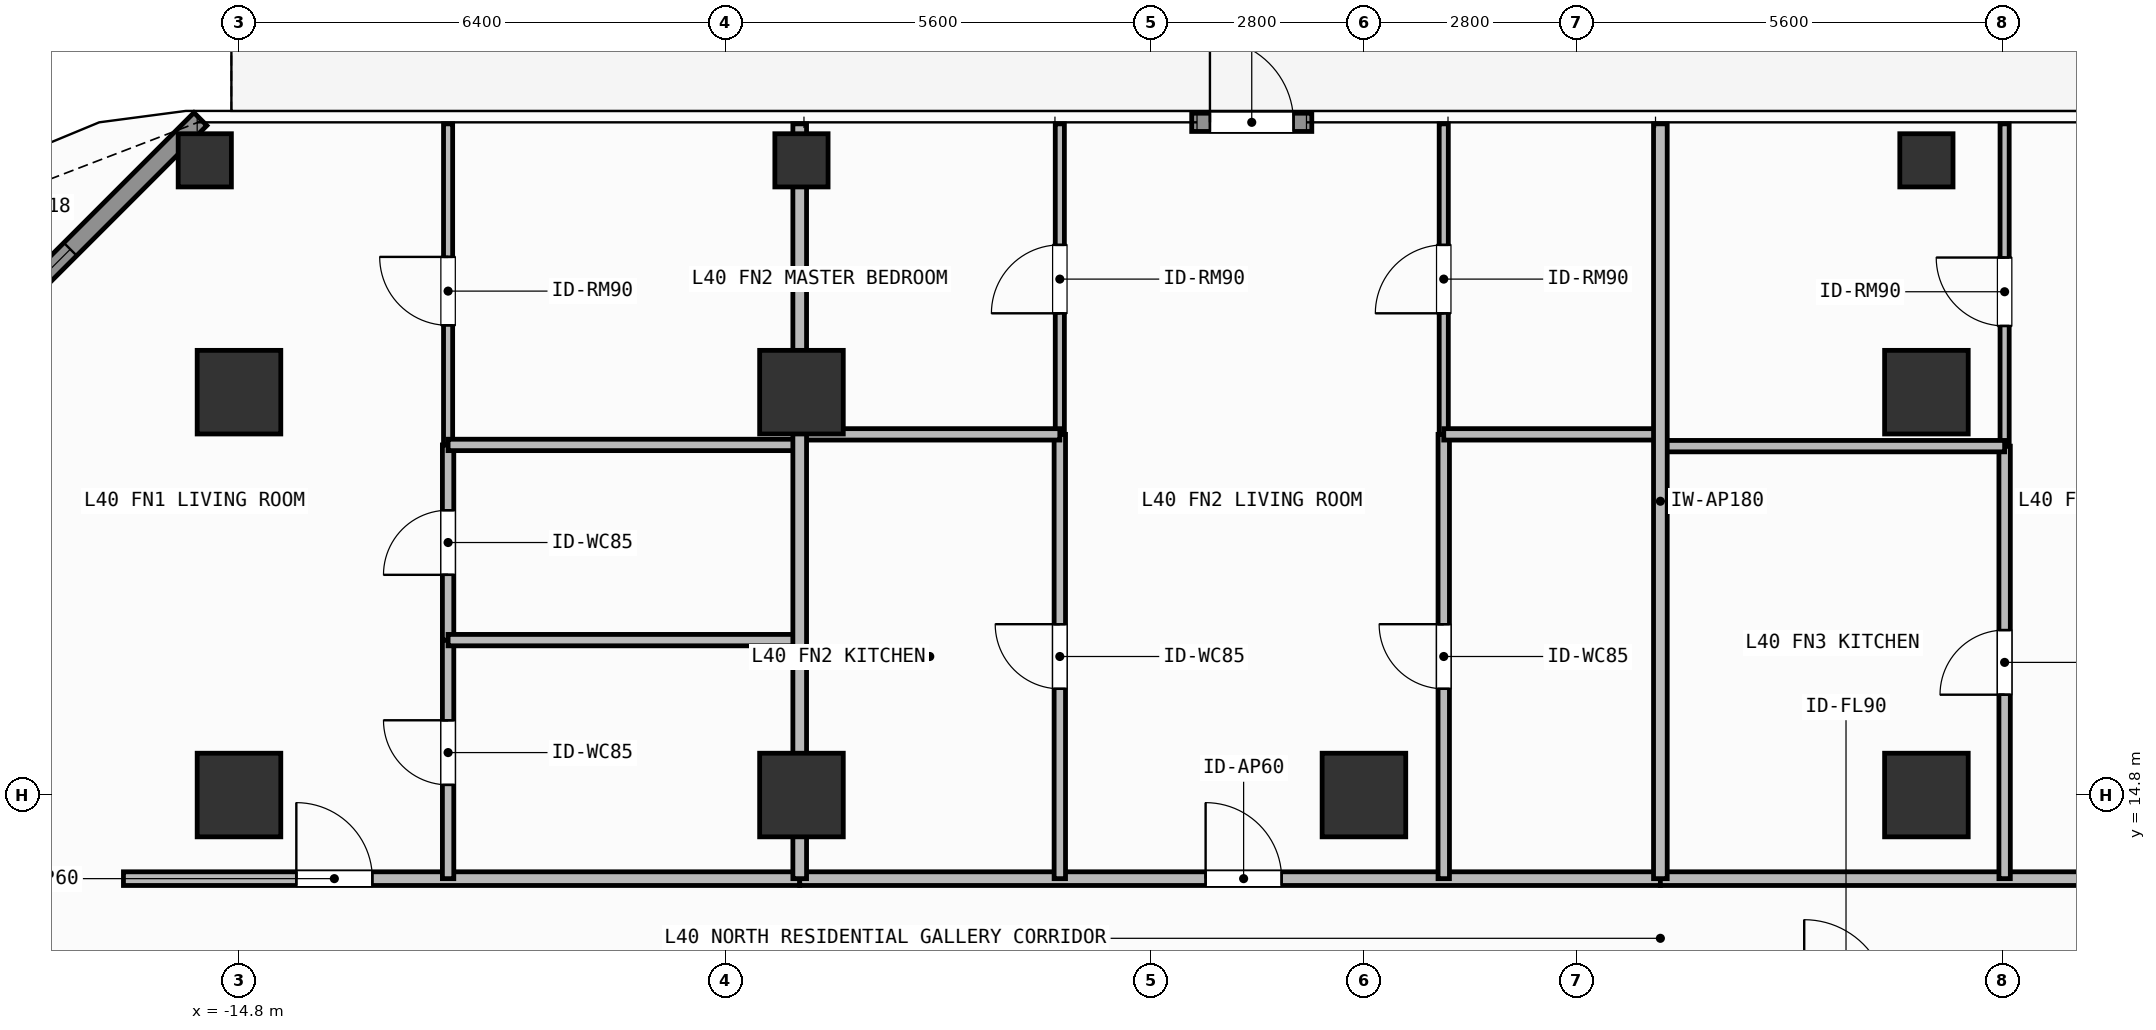
"""IFC4 building model, lengths in metres.
Left out: names, types, materials, properties, quantities, classifications, styles, units other than length and angle.
Written with IfcOpenShell. Run it as: python <this file> out.ifc"""

import sys

from ifc_helpers import new_model, si_unit, direction, frame, frame_2d, origin, origin_2d, place, context, subcontext, project, spatial, rectangle, hollow_rectangle, extrude, element, fill, save


model = new_model("IFC4")
c1 = context("Model", 3, precision=1e-05, world=origin(), true_north=direction((0.0, 1.0)))
c2 = subcontext(c1, "Body", "Model", "MODEL_VIEW")
j1 = project(units=[si_unit("LENGTHUNIT", "METRE"), si_unit("PLANEANGLEUNIT", "RADIAN")], contexts=[c1])
p1 = place(None, origin())
s1 = spatial("IfcSite", under=j1, at=p1, CompositionType="ELEMENT")
p2 = place(p1, origin())
s2 = spatial("IfcBuilding", under=s1, at=p2, CompositionType="ELEMENT")
p3 = place(p2, frame((0.0, 0.0, 164.1)))
s3 = spatial("IfcBuildingStorey", under=s2, at=p3, CompositionType="ELEMENT", Elevation=164.1)
for number, where, z_axis, x_axis in (
    (1, (-14.8, 14.8, 0.0), (0.0, 0.0, 1.0), (1.0, 0.0, 0.0)),
    (2, (-7.4, 14.8, 0.0), (0.0, 0.0, 1.0), (1.0, 0.0, 0.0)),
    (3, (0.0, 14.8, 0.0), (0.0, 0.0, 1.0), (1.0, 0.0, 0.0)),
    (4, (7.4, 14.8, 0.0), (0.0, 0.0, 1.0), (1.0, 0.0, 0.0)),
    (5, (-14.8, 20.1, 0.0), (0.0, 0.0, 1.0), (1.0, 0.0, 0.0)),
    (6, (-7.4, 20.1, 0.0), (0.0, 0.0, 1.0), (1.0, 0.0, 0.0)),
    (7, (7.4, 20.1, 0.0), (0.0, 0.0, 1.0), (1.0, 0.0, 0.0)),
):
    element("IfcColumn", number, at=place(p3, frame(where, z_axis=z_axis, x_axis=x_axis)), inside=s3, PredefinedType="COLUMN", context=c2, shape_type="SweptSolid", body=[
        extrude(rectangle(XDim=1.1, YDim=1.1, at=origin_2d()), origin(), (0.0, 0.0, 1.0), 3.9),
    ])
for number, where, z_axis, x_axis in (
    (8, (-15.25, 23.15, 0.0), (0.0, 0.0, 1.0), (1.0, 0.0, 0.0)),
    (9, (-7.4, 23.15, 0.0), (0.0, 0.0, 1.0), (1.0, 0.0, 0.0)),
    (10, (7.4, 23.15, 0.0), (0.0, 0.0, 1.0), (1.0, 0.0, 0.0)),
):
    element("IfcColumn", number, at=place(p3, frame(where, z_axis=z_axis, x_axis=x_axis)), inside=s3, PredefinedType="COLUMN", context=c2, shape_type="SweptSolid", body=[
        extrude(hollow_rectangle(XDim=0.7, YDim=0.7, WallThickness=0.032, at=origin_2d()), origin(), (0.0, 0.0, 1.0), 3.9),
    ])
p4 = place(p3, frame((-2.266, 23.65, 0.0), z_axis=(0.0, 0.0, 1.0), x_axis=(1.0, 0.0, 0.0)))
e11 = element("IfcWall", 11, at=p4, inside=s3, PredefinedType="SOLIDWALL", context=c2, shape_type="SweptSolid", body=[
    extrude(rectangle(XDim=1.58, YDim=0.24, at=frame_2d((0.79, 0.0))), origin(), (0.0, 0.0, 1.0), 3.62),
])
p5 = place(p4, frame((0.24, 0.0, 0.0)))
e12 = element("IfcOpeningElement", 12, at=p5, cuts=e11, PredefinedType="OPENING", context=c2, shape_type="SweptSolid", body=[
    extrude(rectangle(XDim=1.1, YDim=2.2, at=frame_2d((0.55, 1.1))), frame((0.0, 0.13, 0.0), z_axis=(0.0, -1.0, 0.0), x_axis=(1.0, 0.0, 0.0)), (0.0, 0.0, 1.0), 0.26),
])
p6 = place(p3, frame((-19.792, 19.208, 0.0), z_axis=(0.0, 0.0, 1.0), x_axis=(0.707106781187, 0.707106781187, 0.0)))
e13 = element("IfcWall", 13, at=p6, inside=s3, PredefinedType="SOLIDWALL", context=c2, shape_type="SweptSolid", body=[
    extrude(rectangle(XDim=6.343, YDim=0.24, at=frame_2d((3.171, 0.0))), origin(), (0.0, 0.0, 1.0), 3.62),
])
p7 = place(p6, frame((2.421, 0.0, 0.8)))
e14 = element("IfcOpeningElement", 14, at=p7, cuts=e13, PredefinedType="OPENING", context=c2, shape_type="SweptSolid", body=[
    extrude(rectangle(XDim=1.5, YDim=1.85, at=frame_2d((0.75, 0.925))), frame((0.0, 0.13, 0.0), z_axis=(0.0, -1.0, 0.0), x_axis=(1.0, 0.0, 0.0)), (0.0, 0.0, 1.0), 0.26),
])
p8 = place(p3, frame((-16.32, 13.7, 0.0), z_axis=(0.0, 0.0, 1.0), x_axis=(1.0, 0.0, 0.0)))
e15 = element("IfcWall", 15, at=p8, inside=s3, PredefinedType="PARTITIONING", context=c2, shape_type="SweptSolid", body=[
    extrude(rectangle(XDim=8.897, YDim=0.18, at=frame_2d((4.448, 0.0))), origin(), (0.0, 0.0, 1.0), 3.62),
])
p9 = place(p8, frame((2.274, 0.0, 0.0)))
e16 = element("IfcOpeningElement", 16, at=p9, cuts=e15, PredefinedType="OPENING", context=c2, shape_type="SweptSolid", body=[
    extrude(rectangle(XDim=1.0, YDim=2.2, at=frame_2d((0.5, 1.1))), frame((0.0, 0.1, 0.0), z_axis=(0.0, -1.0, 0.0), x_axis=(1.0, 0.0, 0.0)), (0.0, 0.0, 1.0), 0.2),
])
p10 = place(p3, frame((-12.049, 13.7, 0.0), z_axis=(0.0, 0.0, 1.0), x_axis=(0.0, 1.0, 0.0)))
e17 = element("IfcWall", 17, at=p10, inside=s3, PredefinedType="PARTITIONING", context=c2, shape_type="SweptSolid", body=[
    extrude(rectangle(XDim=3.138, YDim=0.15, at=frame_2d((1.569, 0.0))), origin(), (0.0, 0.0, 1.0), 3.62),
])
p11 = place(p10, frame((1.233, 0.0, 0.0)))
e18 = element("IfcOpeningElement", 18, at=p11, cuts=e17, PredefinedType="OPENING", context=c2, shape_type="SweptSolid", body=[
    extrude(rectangle(XDim=0.85, YDim=2.1, at=frame_2d((0.425, 1.05))), frame((0.0, 0.085, 0.0), z_axis=(0.0, -1.0, 0.0), x_axis=(1.0, 0.0, 0.0)), (0.0, 0.0, 1.0), 0.17),
])
p12 = place(p3, frame((-12.049, 16.838, 0.0), z_axis=(0.0, 0.0, 1.0), x_axis=(0.0, 1.0, 0.0)))
e19 = element("IfcWall", 19, at=p12, inside=s3, PredefinedType="PARTITIONING", context=c2, shape_type="SweptSolid", body=[
    extrude(rectangle(XDim=2.568, YDim=0.15, at=frame_2d((1.284, 0.0))), origin(), (0.0, 0.0, 1.0), 3.62),
])
p13 = place(p12, frame((0.859, 0.0, 0.0)))
e20 = element("IfcOpeningElement", 20, at=p13, cuts=e19, PredefinedType="OPENING", context=c2, shape_type="SweptSolid", body=[
    extrude(rectangle(XDim=0.85, YDim=2.1, at=frame_2d((0.425, 1.05))), frame((0.0, 0.085, 0.0), z_axis=(0.0, -1.0, 0.0), x_axis=(1.0, 0.0, 0.0)), (0.0, 0.0, 1.0), 0.17),
])
p14 = place(p3, frame((-12.049, 19.406, 0.0), z_axis=(0.0, 0.0, 1.0), x_axis=(0.0, 1.0, 0.0)))
e21 = element("IfcWall", 21, at=p14, inside=s3, PredefinedType="PARTITIONING", context=c2, shape_type="SweptSolid", body=[
    extrude(rectangle(XDim=4.224, YDim=0.12, at=frame_2d((2.112, 0.0))), origin(), (0.0, 0.0, 1.0), 3.62),
])
p15 = place(p14, frame((1.573, 0.0, 0.0)))
e22 = element("IfcOpeningElement", 22, at=p15, cuts=e21, PredefinedType="OPENING", context=c2, shape_type="SweptSolid", body=[
    extrude(rectangle(XDim=0.9, YDim=2.1, at=frame_2d((0.45, 1.05))), frame((0.0, 0.07, 0.0), z_axis=(0.0, -1.0, 0.0), x_axis=(1.0, 0.0, 0.0)), (0.0, 0.0, 1.0), 0.14),
])
p16 = place(p3, frame((-7.423, 13.7, 0.0), z_axis=(0.0, 0.0, 1.0), x_axis=(1.0, 0.0, 0.0)))
e23 = element("IfcWall", 23, at=p16, inside=s3, PredefinedType="PARTITIONING", context=c2, shape_type="SweptSolid", body=[
    extrude(rectangle(XDim=11.323, YDim=0.18, at=frame_2d((5.662, 0.0))), origin(), (0.0, 0.0, 1.0), 3.62),
])
p17 = place(p16, frame((5.34, 0.0, 0.0)))
e24 = element("IfcOpeningElement", 24, at=p17, cuts=e23, PredefinedType="OPENING", context=c2, shape_type="SweptSolid", body=[
    extrude(rectangle(XDim=1.0, YDim=2.2, at=frame_2d((0.5, 1.1))), frame((0.0, 0.1, 0.0), z_axis=(0.0, -1.0, 0.0), x_axis=(1.0, 0.0, 0.0)), (0.0, 0.0, 1.0), 0.2),
])
p18 = place(p3, frame((-4.001, 13.7, 0.0), z_axis=(0.0, 0.0, 1.0), x_axis=(0.0, 1.0, 0.0)))
e25 = element("IfcWall", 25, at=p18, inside=s3, PredefinedType="PARTITIONING", context=c2, shape_type="SweptSolid", body=[
    extrude(rectangle(XDim=5.845, YDim=0.15, at=frame_2d((2.922, 0.0))), origin(), (0.0, 0.0, 1.0), 3.62),
])
p19 = place(p18, frame((2.498, 0.0, 0.0)))
e26 = element("IfcOpeningElement", 26, at=p19, cuts=e25, PredefinedType="OPENING", context=c2, shape_type="SweptSolid", body=[
    extrude(rectangle(XDim=0.85, YDim=2.1, at=frame_2d((0.425, 1.05))), frame((0.0, 0.085, 0.0), z_axis=(0.0, -1.0, 0.0), x_axis=(1.0, 0.0, 0.0)), (0.0, 0.0, 1.0), 0.17),
])
p20 = place(p3, frame((-4.001, 19.545, 0.0), z_axis=(0.0, 0.0, 1.0), x_axis=(0.0, 1.0, 0.0)))
e27 = element("IfcWall", 27, at=p20, inside=s3, PredefinedType="PARTITIONING", context=c2, shape_type="SweptSolid", body=[
    extrude(rectangle(XDim=4.085, YDim=0.12, at=frame_2d((2.042, 0.0))), origin(), (0.0, 0.0, 1.0), 3.62),
])
p21 = place(p20, frame((1.593, 0.0, 0.0)))
e28 = element("IfcOpeningElement", 28, at=p21, cuts=e27, PredefinedType="OPENING", context=c2, shape_type="SweptSolid", body=[
    extrude(rectangle(XDim=0.9, YDim=2.1, at=frame_2d((0.45, 1.05))), frame((0.0, 0.07, 0.0), z_axis=(0.0, -1.0, 0.0), x_axis=(1.0, 0.0, 0.0)), (0.0, 0.0, 1.0), 0.14),
])
p22 = place(p3, frame((1.05, 13.7, 0.0), z_axis=(0.0, 0.0, 1.0), x_axis=(0.0, 1.0, 0.0)))
e29 = element("IfcWall", 29, at=p22, inside=s3, PredefinedType="PARTITIONING", context=c2, shape_type="SweptSolid", body=[
    extrude(rectangle(XDim=5.845, YDim=0.15, at=frame_2d((2.922, 0.0))), origin(), (0.0, 0.0, 1.0), 3.62),
])
p23 = place(p22, frame((2.498, 0.0, 0.0)))
e30 = element("IfcOpeningElement", 30, at=p23, cuts=e29, PredefinedType="OPENING", context=c2, shape_type="SweptSolid", body=[
    extrude(rectangle(XDim=0.85, YDim=2.1, at=frame_2d((0.425, 1.05))), frame((0.0, 0.085, 0.0), z_axis=(0.0, -1.0, 0.0), x_axis=(1.0, 0.0, 0.0)), (0.0, 0.0, 1.0), 0.17),
])
p24 = place(p3, frame((1.05, 19.545, 0.0), z_axis=(0.0, 0.0, 1.0), x_axis=(0.0, 1.0, 0.0)))
e31 = element("IfcWall", 31, at=p24, inside=s3, PredefinedType="PARTITIONING", context=c2, shape_type="SweptSolid", body=[
    extrude(rectangle(XDim=4.085, YDim=0.12, at=frame_2d((2.042, 0.0))), origin(), (0.0, 0.0, 1.0), 3.62),
])
p25 = place(p24, frame((1.593, 0.0, 0.0)))
e32 = element("IfcOpeningElement", 32, at=p25, cuts=e31, PredefinedType="OPENING", context=c2, shape_type="SweptSolid", body=[
    extrude(rectangle(XDim=0.9, YDim=2.1, at=frame_2d((0.45, 1.05))), frame((0.0, 0.07, 0.0), z_axis=(0.0, -1.0, 0.0), x_axis=(1.0, 0.0, 0.0)), (0.0, 0.0, 1.0), 0.14),
])
p26 = place(p3, frame((3.9, 13.7, 0.0), z_axis=(0.0, 0.0, 1.0), x_axis=(1.0, 0.0, 0.0)))
e33 = element("IfcWall", 33, at=p26, inside=s3, PredefinedType="PARTITIONING", context=c2, shape_type="SweptSolid", body=[
    extrude(rectangle(XDim=11.323, YDim=0.18, at=frame_2d((5.662, 0.0))), origin(), (0.0, 0.0, 1.0), 3.62),
])
p27 = place(p26, frame((5.519, 0.0, 0.0)))
e34 = element("IfcOpeningElement", 34, at=p27, cuts=e33, PredefinedType="OPENING", context=c2, shape_type="SweptSolid", body=[
    extrude(rectangle(XDim=1.0, YDim=2.2, at=frame_2d((0.5, 1.1))), frame((0.0, 0.1, 0.0), z_axis=(0.0, -1.0, 0.0), x_axis=(1.0, 0.0, 0.0)), (0.0, 0.0, 1.0), 0.2),
])
p28 = place(p3, frame((8.429, 13.7, 0.0), z_axis=(0.0, 0.0, 1.0), x_axis=(0.0, 1.0, 0.0)))
e35 = element("IfcWall", 35, at=p28, inside=s3, PredefinedType="PARTITIONING", context=c2, shape_type="SweptSolid", body=[
    extrude(rectangle(XDim=5.69, YDim=0.15, at=frame_2d((2.845, 0.0))), origin(), (0.0, 0.0, 1.0), 3.62),
])
p29 = place(p28, frame((2.42, 0.0, 0.0)))
e36 = element("IfcOpeningElement", 36, at=p29, cuts=e35, PredefinedType="OPENING", context=c2, shape_type="SweptSolid", body=[
    extrude(rectangle(XDim=0.85, YDim=2.1, at=frame_2d((0.425, 1.05))), frame((0.0, 0.085, 0.0), z_axis=(0.0, -1.0, 0.0), x_axis=(1.0, 0.0, 0.0)), (0.0, 0.0, 1.0), 0.17),
])
p30 = place(p3, frame((8.429, 19.39, 0.0), z_axis=(0.0, 0.0, 1.0), x_axis=(0.0, 1.0, 0.0)))
e37 = element("IfcWall", 37, at=p30, inside=s3, PredefinedType="PARTITIONING", context=c2, shape_type="SweptSolid", body=[
    extrude(rectangle(XDim=4.24, YDim=0.12, at=frame_2d((2.12, 0.0))), origin(), (0.0, 0.0, 1.0), 3.62),
])
p31 = place(p30, frame((1.581, 0.0, 0.0)))
e38 = element("IfcOpeningElement", 38, at=p31, cuts=e37, PredefinedType="OPENING", context=c2, shape_type="SweptSolid", body=[
    extrude(rectangle(XDim=0.9, YDim=2.1, at=frame_2d((0.45, 1.05))), frame((0.0, 0.07, 0.0), z_axis=(0.0, -1.0, 0.0), x_axis=(1.0, 0.0, 0.0)), (0.0, 0.0, 1.0), 0.14),
])
for number, where, z_axis, x_axis in (
    (39, (-12.049, 16.838, 0.0), (0.0, 0.0, 1.0), (1.0, 0.0, 0.0)),
    (40, (-12.049, 19.406, 0.0), (0.0, 0.0, 1.0), (1.0, 0.0, 0.0)),
):
    element("IfcWall", number, at=place(p3, frame(where, z_axis=z_axis, x_axis=x_axis)), inside=s3, PredefinedType="PARTITIONING", context=c2, shape_type="SweptSolid", body=[
        extrude(rectangle(XDim=4.626, YDim=0.15, at=frame_2d((2.313, 0.0))), origin(), (0.0, 0.0, 1.0), 3.62),
    ])
p32 = place(p3, frame((-7.423, 19.545, 0.0), z_axis=(0.0, 0.0, 1.0), x_axis=(1.0, 0.0, 0.0)))
e41 = element("IfcWall", 41, at=p32, inside=s3, PredefinedType="PARTITIONING", context=c2, shape_type="SweptSolid", body=[
    extrude(rectangle(XDim=3.422, YDim=0.15, at=frame_2d((1.711, 0.0))), origin(), (0.0, 0.0, 1.0), 3.62),
])
p33 = place(p3, frame((1.05, 19.545, 0.0), z_axis=(0.0, 0.0, 1.0), x_axis=(1.0, 0.0, 0.0)))
e42 = element("IfcWall", 42, at=p33, inside=s3, PredefinedType="PARTITIONING", context=c2, shape_type="SweptSolid", body=[
    extrude(rectangle(XDim=2.85, YDim=0.15, at=frame_2d((1.425, 0.0))), origin(), (0.0, 0.0, 1.0), 3.62),
])
p34 = place(p3, frame((-7.423, 13.7, 0.0), z_axis=(0.0, 0.0, 1.0), x_axis=(0.0, 1.0, 0.0)))
e43 = element("IfcWall", 43, at=p34, inside=s3, PredefinedType="PARTITIONING", context=c2, shape_type="SweptSolid", body=[
    extrude(rectangle(XDim=9.93, YDim=0.18, at=frame_2d((4.965, 0.0))), origin(), (0.0, 0.0, 1.0), 2.71),
])
p35 = place(p3, frame((3.9, 19.39, 0.0), z_axis=(0.0, 0.0, 1.0), x_axis=(1.0, 0.0, 0.0)))
e44 = element("IfcWall", 44, at=p35, inside=s3, PredefinedType="PARTITIONING", context=c2, shape_type="SweptSolid", body=[
    extrude(rectangle(XDim=4.529, YDim=0.15, at=frame_2d((2.265, 0.0))), origin(), (0.0, 0.0, 1.0), 3.62),
])
p36 = place(p3, frame((3.9, 13.7, 0.0), z_axis=(0.0, 0.0, 1.0), x_axis=(0.0, 1.0, 0.0)))
e45 = element("IfcWall", 45, at=p36, inside=s3, PredefinedType="PARTITIONING", context=c2, shape_type="SweptSolid", body=[
    extrude(rectangle(XDim=9.93, YDim=0.18, at=frame_2d((4.965, 0.0))), origin(), (0.0, 0.0, 1.0), 3.62),
])
p37 = place(p5, origin())
e46 = element("IfcDoor", 46, at=p37, inside=s3, OperationType="SINGLE_SWING_LEFT", PredefinedType="DOOR", context=c2, shape_type="SweptSolid", body=[
    extrude(rectangle(XDim=1.1, YDim=2.2, at=frame_2d((0.55, 1.1))), frame((0.0, 0.025, 0.0), z_axis=(0.0, -1.0, 0.0), x_axis=(1.0, 0.0, 0.0)), (0.0, 0.0, 1.0), 0.05),
])
fill(e12, e46)
p38 = place(p7, origin())
e47 = element("IfcWindow", 47, at=p38, inside=s3, PartitioningType="SINGLE_PANEL", PredefinedType="WINDOW", context=c2, shape_type="SweptSolid", body=[
    extrude(rectangle(XDim=1.5, YDim=1.85, at=frame_2d((0.75, 0.925))), frame((0.0, 0.03, 0.0), z_axis=(0.0, -1.0, 0.0), x_axis=(1.0, 0.0, 0.0)), (0.0, 0.0, 1.0), 0.06),
])
fill(e14, e47)
p39 = place(p9, origin())
e48 = element("IfcDoor", 48, at=p39, inside=s3, OperationType="SINGLE_SWING_LEFT", PredefinedType="DOOR", context=c2, shape_type="SweptSolid", body=[
    extrude(rectangle(XDim=1.0, YDim=2.2, at=frame_2d((0.5, 1.1))), frame((0.0, 0.025, 0.0), z_axis=(0.0, -1.0, 0.0), x_axis=(1.0, 0.0, 0.0)), (0.0, 0.0, 1.0), 0.05),
])
fill(e16, e48)
p40 = place(p11, origin())
e49 = element("IfcDoor", 49, at=p40, inside=s3, OperationType="SINGLE_SWING_RIGHT", PredefinedType="DOOR", context=c2, shape_type="SweptSolid", body=[
    extrude(rectangle(XDim=0.85, YDim=2.1, at=frame_2d((0.425, 1.05))), frame((0.0, 0.025, 0.0), z_axis=(0.0, -1.0, 0.0), x_axis=(1.0, 0.0, 0.0)), (0.0, 0.0, 1.0), 0.05),
])
fill(e18, e49)
p41 = place(p13, origin())
e50 = element("IfcDoor", 50, at=p41, inside=s3, OperationType="SINGLE_SWING_LEFT", PredefinedType="DOOR", context=c2, shape_type="SweptSolid", body=[
    extrude(rectangle(XDim=0.85, YDim=2.1, at=frame_2d((0.425, 1.05))), frame((0.0, 0.025, 0.0), z_axis=(0.0, -1.0, 0.0), x_axis=(1.0, 0.0, 0.0)), (0.0, 0.0, 1.0), 0.05),
])
fill(e20, e50)
p42 = place(p15, origin())
e51 = element("IfcDoor", 51, at=p42, inside=s3, OperationType="SINGLE_SWING_RIGHT", PredefinedType="DOOR", context=c2, shape_type="SweptSolid", body=[
    extrude(rectangle(XDim=0.9, YDim=2.1, at=frame_2d((0.45, 1.05))), frame((0.0, 0.025, 0.0), z_axis=(0.0, -1.0, 0.0), x_axis=(1.0, 0.0, 0.0)), (0.0, 0.0, 1.0), 0.05),
])
fill(e22, e51)
p43 = place(p17, origin())
e52 = element("IfcDoor", 52, at=p43, inside=s3, OperationType="SINGLE_SWING_LEFT", PredefinedType="DOOR", context=c2, shape_type="SweptSolid", body=[
    extrude(rectangle(XDim=1.0, YDim=2.2, at=frame_2d((0.5, 1.1))), frame((0.0, 0.025, 0.0), z_axis=(0.0, -1.0, 0.0), x_axis=(1.0, 0.0, 0.0)), (0.0, 0.0, 1.0), 0.05),
])
fill(e24, e52)
p44 = place(p19, origin())
e53 = element("IfcDoor", 53, at=p44, inside=s3, OperationType="SINGLE_SWING_RIGHT", PredefinedType="DOOR", context=c2, shape_type="SweptSolid", body=[
    extrude(rectangle(XDim=0.85, YDim=2.1, at=frame_2d((0.425, 1.05))), frame((0.0, 0.025, 0.0), z_axis=(0.0, -1.0, 0.0), x_axis=(1.0, 0.0, 0.0)), (0.0, 0.0, 1.0), 0.05),
])
fill(e26, e53)
p45 = place(p21, origin())
e54 = element("IfcDoor", 54, at=p45, inside=s3, OperationType="SINGLE_SWING_LEFT", PredefinedType="DOOR", context=c2, shape_type="SweptSolid", body=[
    extrude(rectangle(XDim=0.9, YDim=2.1, at=frame_2d((0.45, 1.05))), frame((0.0, 0.025, 0.0), z_axis=(0.0, -1.0, 0.0), x_axis=(1.0, 0.0, 0.0)), (0.0, 0.0, 1.0), 0.05),
])
fill(e28, e54)
p46 = place(p23, origin())
e55 = element("IfcDoor", 55, at=p46, inside=s3, OperationType="SINGLE_SWING_RIGHT", PredefinedType="DOOR", context=c2, shape_type="SweptSolid", body=[
    extrude(rectangle(XDim=0.85, YDim=2.1, at=frame_2d((0.425, 1.05))), frame((0.0, 0.025, 0.0), z_axis=(0.0, -1.0, 0.0), x_axis=(1.0, 0.0, 0.0)), (0.0, 0.0, 1.0), 0.05),
])
fill(e30, e55)
p47 = place(p25, origin())
e56 = element("IfcDoor", 56, at=p47, inside=s3, OperationType="SINGLE_SWING_LEFT", PredefinedType="DOOR", context=c2, shape_type="SweptSolid", body=[
    extrude(rectangle(XDim=0.9, YDim=2.1, at=frame_2d((0.45, 1.05))), frame((0.0, 0.025, 0.0), z_axis=(0.0, -1.0, 0.0), x_axis=(1.0, 0.0, 0.0)), (0.0, 0.0, 1.0), 0.05),
])
fill(e32, e56)
p48 = place(p29, origin())
e57 = element("IfcDoor", 57, at=p48, inside=s3, OperationType="SINGLE_SWING_LEFT", PredefinedType="DOOR", context=c2, shape_type="SweptSolid", body=[
    extrude(rectangle(XDim=0.85, YDim=2.1, at=frame_2d((0.425, 1.05))), frame((0.0, 0.025, 0.0), z_axis=(0.0, -1.0, 0.0), x_axis=(1.0, 0.0, 0.0)), (0.0, 0.0, 1.0), 0.05),
])
fill(e36, e57)
p49 = place(p31, origin())
e58 = element("IfcDoor", 58, at=p49, inside=s3, OperationType="SINGLE_SWING_RIGHT", PredefinedType="DOOR", context=c2, shape_type="SweptSolid", body=[
    extrude(rectangle(XDim=0.9, YDim=2.1, at=frame_2d((0.45, 1.05))), frame((0.0, 0.025, 0.0), z_axis=(0.0, -1.0, 0.0), x_axis=(1.0, 0.0, 0.0)), (0.0, 0.0, 1.0), 0.05),
])
fill(e38, e58)
save(model, sys.argv[1])
